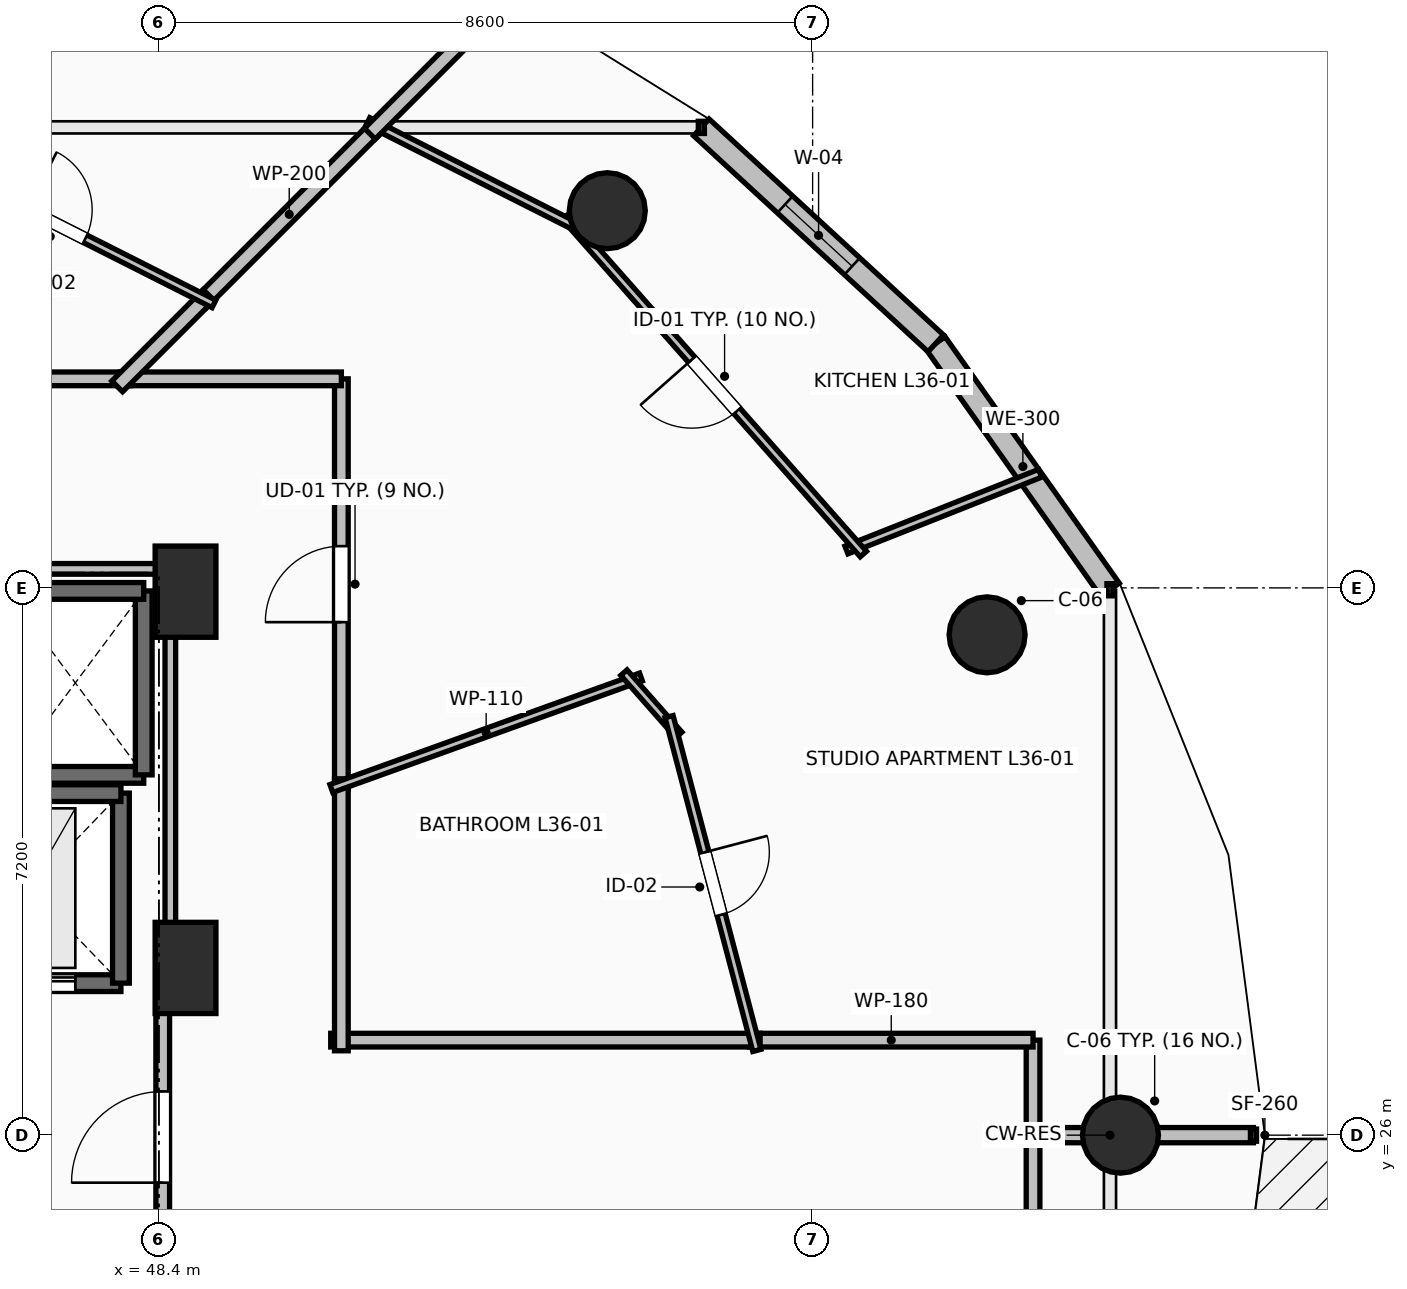
"""IFC4 building model, lengths in metres.
Left out: names, types, materials, properties, quantities, classifications, styles, units other than length and angle.
Written with IfcOpenShell. Run it as: python <this file> out.ifc"""

import sys

from ifc_helpers import new_model, si_unit, direction, frame, frame_2d, origin, origin_2d, place, context, subcontext, project, spatial, rectangle, circle, extrude, element, fill, save


model = new_model("IFC4")
c1 = context("Model", 3, precision=1e-05, world=origin(), true_north=direction((0.0, 1.0)))
c2 = subcontext(c1, "Body", "Model", "MODEL_VIEW")
j1 = project(units=[si_unit("LENGTHUNIT", "METRE"), si_unit("PLANEANGLEUNIT", "RADIAN")], contexts=[c1])
p1 = place(None, origin())
s1 = spatial("IfcSite", under=j1, at=p1, CompositionType="ELEMENT")
p2 = place(p1, origin())
s2 = spatial("IfcBuilding", under=s1, at=p2, CompositionType="ELEMENT")
p3 = place(p2, frame((0.0, 0.0, 136.1)))
s3 = spatial("IfcBuildingStorey", under=s2, at=p3, CompositionType="ELEMENT", Elevation=136.1)
for number, where, z_axis, x_axis in (
    (1, (61.05, 26.0, 0.0), (0.0, 0.0, 1.0), (1.0, 0.0, 0.0)),
    (2, (59.295, 32.582, 0.0), (0.0, 0.0, 1.0), (0.924, 0.383, 0.0)),
    (3, (54.299, 38.162, 0.0), (0.0, 0.0, 1.0), (0.707, 0.707, 0.0)),
):
    element("IfcColumn", number, at=place(p3, frame(where, z_axis=z_axis, x_axis=x_axis)), inside=s3, PredefinedType="COLUMN", context=c2, shape_type="SweptSolid", body=[
        extrude(circle(Radius=0.5, at=origin_2d()), origin(), (0.0, 0.0, 1.0), 3.5),
    ])
for number, where, z_axis, x_axis in (
    (4, (48.75, 33.15, 0.0), (0.0, 0.0, 1.0), (1.0, 0.0, 0.0)),
    (5, (48.75, 28.2, 0.0), (0.0, 0.0, 1.0), (1.0, 0.0, 0.0)),
):
    element("IfcColumn", number, at=place(p3, frame(where, z_axis=z_axis, x_axis=x_axis)), inside=s3, PredefinedType="PILASTER", context=c2, shape_type="SweptSolid", body=[
        extrude(rectangle(XDim=0.8, YDim=1.2, at=origin_2d()), origin(), (0.0, 0.0, 1.0), 3.5),
    ])
p4 = place(p3, frame((60.912, 33.175, 0.0), z_axis=(0.0, 0.0, 1.0), x_axis=(-0.577269753207, 0.816553508371, 0.0)))
e6 = element("IfcWall", 6, at=p4, inside=s3, PredefinedType="STANDARD", context=c2, shape_type="SweptSolid", body=[
    extrude(rectangle(XDim=3.97, YDim=0.3, at=frame_2d((1.985, 0.0))), origin(), (0.0, 0.0, 1.0), 3.24),
])
p5 = place(p3, frame((58.62, 36.417, 0.0), z_axis=(0.0, 0.0, 1.0), x_axis=(-0.735477154165, 0.677549522693, 0.0)))
e7 = element("IfcWall", 7, at=p5, inside=s3, PredefinedType="STANDARD", context=c2, shape_type="SweptSolid", body=[
    extrude(rectangle(XDim=4.194, YDim=0.3, at=frame_2d((2.097, 0.0))), origin(), (0.0, 0.0, 1.0), 3.24),
])
p6 = place(p5, frame((1.497, 0.0, 0.85)))
e8 = element("IfcOpeningElement", 8, at=p6, cuts=e7, PredefinedType="OPENING", context=c2, shape_type="SweptSolid", body=[
    extrude(rectangle(XDim=1.2, YDim=2.1, at=frame_2d((0.6, 1.05))), frame((0.0, 0.165, 0.0), z_axis=(0.0, -1.0, 0.0), x_axis=(1.0, 0.0, 0.0)), (0.0, 0.0, 1.0), 0.33),
])
p7 = place(p3, frame((46.4, 30.74, 0.0), z_axis=(0.0, 0.0, 1.0), x_axis=(1.0, 0.0, 0.0)))
e9 = element("IfcWall", 9, at=p7, inside=s3, PredefinedType="SOLIDWALL", context=c2, shape_type="SweptSolid", body=[
    extrude(rectangle(XDim=1.8, YDim=0.22, at=frame_2d((0.9, 0.0))), origin(), (0.0, 0.0, 1.0), 3.24),
])
p8 = place(p3, frame((48.2, 30.74, 0.0), z_axis=(0.0, 0.0, 1.0), x_axis=(0.0, 1.0, 0.0)))
e10 = element("IfcWall", 10, at=p8, inside=s3, PredefinedType="SOLIDWALL", context=c2, shape_type="SweptSolid", body=[
    extrude(rectangle(XDim=2.42, YDim=0.22, at=frame_2d((1.21, 0.0))), origin(), (0.0, 0.0, 1.0), 3.24),
])
p9 = place(p3, frame((48.2, 33.16, 0.0), z_axis=(0.0, 0.0, 1.0), x_axis=(-1.0, 0.0, 0.0)))
e11 = element("IfcWall", 11, at=p9, inside=s3, PredefinedType="SOLIDWALL", context=c2, shape_type="SweptSolid", body=[
    extrude(rectangle(XDim=1.8, YDim=0.22, at=frame_2d((0.9, 0.0))), origin(), (0.0, 0.0, 1.0), 3.24),
])
p10 = place(p3, frame((45.5, 28.0, 0.0), z_axis=(0.0, 0.0, 1.0), x_axis=(1.0, 0.0, 0.0)))
e12 = element("IfcWall", 12, at=p10, inside=s3, PredefinedType="SHEAR", context=c2, shape_type="SweptSolid", body=[
    extrude(rectangle(XDim=2.4, YDim=0.22, at=frame_2d((1.2, 0.0))), origin(), (0.0, 0.0, 1.0), 3.24),
])
p11 = place(p10, frame((0.6, 0.0, 0.0)))
e13 = element("IfcOpeningElement", 13, at=p11, cuts=e12, PredefinedType="OPENING", context=c2, shape_type="SweptSolid", body=[
    extrude(rectangle(XDim=1.2, YDim=2.2, at=frame_2d((0.6, 1.1))), frame((0.0, 0.125, 0.0), z_axis=(0.0, -1.0, 0.0), x_axis=(1.0, 0.0, 0.0)), (0.0, 0.0, 1.0), 0.25),
])
p12 = place(p3, frame((47.9, 28.0, 0.0), z_axis=(0.0, 0.0, 1.0), x_axis=(0.0, 1.0, 0.0)))
e14 = element("IfcWall", 14, at=p12, inside=s3, PredefinedType="SHEAR", context=c2, shape_type="SweptSolid", body=[
    extrude(rectangle(XDim=2.5, YDim=0.22, at=frame_2d((1.25, 0.0))), origin(), (0.0, 0.0, 1.0), 3.24),
])
p13 = place(p3, frame((47.9, 30.5, 0.0), z_axis=(0.0, 0.0, 1.0), x_axis=(-1.0, 0.0, 0.0)))
e15 = element("IfcWall", 15, at=p13, inside=s3, PredefinedType="SHEAR", context=c2, shape_type="SweptSolid", body=[
    extrude(rectangle(XDim=2.4, YDim=0.22, at=frame_2d((1.2, 0.0))), origin(), (0.0, 0.0, 1.0), 3.24),
])
p14 = place(p3, frame((48.45, 23.95, 0.0), z_axis=(0.0, 0.0, 1.0), x_axis=(0.0, 1.0, 0.0)))
e16 = element("IfcWall", 16, at=p14, inside=s3, PredefinedType="PARTITIONING", context=c2, shape_type="SweptSolid", body=[
    extrude(rectangle(XDim=4.05, YDim=0.18, at=frame_2d((2.025, 0.0))), origin(), (0.0, 0.0, 1.0), 3.24),
])
p15 = place(p14, frame((1.425, 0.0, 0.0)))
e17 = element("IfcOpeningElement", 17, at=p15, cuts=e16, PredefinedType="OPENING", context=c2, shape_type="SweptSolid", body=[
    extrude(rectangle(XDim=1.2, YDim=2.15, at=frame_2d((0.6, 1.075))), frame((0.0, 0.105, 0.0), z_axis=(0.0, -1.0, 0.0), x_axis=(1.0, 0.0, 0.0)), (0.0, 0.0, 1.0), 0.21),
])
p16 = place(p3, frame((59.9, 25.94, 0.0), z_axis=(0.0, 0.0, 1.0), x_axis=(0.0, 1.0, 0.0)))
e18 = element("IfcWall", 18, at=p16, inside=s3, PredefinedType="PARTITIONING", context=c2, shape_type="SweptSolid", body=[
    extrude(rectangle(XDim=1.31, YDim=0.18, at=frame_2d((0.655, 0.0))), origin(), (0.0, 0.0, 1.0), 2.432),
])
p17 = place(p3, frame((59.9, 27.25, 0.0), z_axis=(0.0, 0.0, 1.0), x_axis=(-1.0, 0.0, 0.0)))
e19 = element("IfcWall", 19, at=p17, inside=s3, PredefinedType="PARTITIONING", context=c2, shape_type="SweptSolid", body=[
    extrude(rectangle(XDim=3.731, YDim=0.18, at=frame_2d((1.865, 0.0))), origin(), (0.0, 0.0, 1.0), 2.874),
])
p18 = place(p3, frame((50.8, 30.548, 0.0), z_axis=(0.0, 0.0, 1.0), x_axis=(0.0, 1.0, 0.0)))
e20 = element("IfcWall", 20, at=p18, inside=s3, PredefinedType="PARTITIONING", context=c2, shape_type="SweptSolid", body=[
    extrude(rectangle(XDim=5.402, YDim=0.18, at=frame_2d((2.701, 0.0))), origin(), (0.0, 0.0, 1.0), 2.432),
])
p19 = place(p18, frame((2.201, 0.0, 0.0)))
e21 = element("IfcOpeningElement", 21, at=p19, cuts=e20, PredefinedType="OPENING", context=c2, shape_type="SweptSolid", body=[
    extrude(rectangle(XDim=1.0, YDim=2.15, at=frame_2d((0.5, 1.075))), frame((0.0, 0.105, 0.0), z_axis=(0.0, -1.0, 0.0), x_axis=(1.0, 0.0, 0.0)), (0.0, 0.0, 1.0), 0.21),
])
p20 = place(p3, frame((50.8, 35.95, 0.0), z_axis=(0.0, 0.0, 1.0), x_axis=(-1.0, 0.0, 0.0)))
e22 = element("IfcWall", 22, at=p20, inside=s3, PredefinedType="PARTITIONING", context=c2, shape_type="SweptSolid", body=[
    extrude(rectangle(XDim=2.91, YDim=0.18, at=frame_2d((1.455, 0.0))), origin(), (0.0, 0.0, 1.0), 2.432),
])
p21 = place(p3, frame((56.309, 27.25, 0.0), z_axis=(0.0, 0.0, 1.0), x_axis=(-1.0, 0.0, 0.0)))
e23 = element("IfcWall", 23, at=p21, inside=s3, PredefinedType="PARTITIONING", context=c2, shape_type="SweptSolid", body=[
    extrude(rectangle(XDim=5.649, YDim=0.18, at=frame_2d((2.825, 0.0))), origin(), (0.0, 0.0, 1.0), 2.432),
])
p22 = place(p3, frame((50.8, 27.11, 0.0), z_axis=(0.0, 0.0, 1.0), x_axis=(0.0, 1.0, 0.0)))
e24 = element("IfcWall", 24, at=p22, inside=s3, PredefinedType="PARTITIONING", context=c2, shape_type="SweptSolid", body=[
    extrude(rectangle(XDim=3.578, YDim=0.18, at=frame_2d((1.789, 0.0))), origin(), (0.0, 0.0, 1.0), 2.432),
])
p23 = place(p3, frame((48.03, 35.95, 0.0), z_axis=(0.0, 0.0, 1.0), x_axis=(-1.0, 0.0, 0.0)))
e25 = element("IfcWall", 25, at=p23, inside=s3, PredefinedType="PARTITIONING", context=c2, shape_type="SweptSolid", body=[
    extrude(rectangle(XDim=5.422, YDim=0.18, at=frame_2d((2.711, 0.0))), origin(), (0.0, 0.0, 1.0), 2.432),
])
p24 = place(p3, frame((59.9, 24.55, 0.0), z_axis=(0.0, 0.0, 1.0), x_axis=(0.0, 1.0, 0.0)))
e26 = element("IfcWall", 26, at=p24, inside=s3, PredefinedType="PARTITIONING", context=c2, shape_type="SweptSolid", body=[
    extrude(rectangle(XDim=1.39, YDim=0.18, at=frame_2d((0.695, 0.0))), origin(), (0.0, 0.0, 1.0), 2.432),
])
p25 = place(p3, frame((50.668, 30.561, 0.0), z_axis=(0.0, 0.0, 1.0), x_axis=(0.94086224956, 0.33878935543, 0.0)))
e27 = element("IfcWall", 27, at=p25, inside=s3, PredefinedType="PARTITIONING", context=c2, shape_type="SweptSolid", body=[
    extrude(rectangle(XDim=4.33, YDim=0.11, at=frame_2d((2.165, 0.0))), origin(), (0.0, 0.0, 1.0), 2.922),
])
p26 = place(p3, frame((54.517, 32.085, 0.0), z_axis=(0.0, 0.0, 1.0), x_axis=(0.661444121134, -0.749994449724, 0.0)))
e28 = element("IfcWall", 28, at=p26, inside=s3, PredefinedType="PARTITIONING", context=c2, shape_type="SweptSolid", body=[
    extrude(rectangle(XDim=1.092, YDim=0.11, at=frame_2d((0.546, 0.0))), origin(), (0.0, 0.0, 1.0), 3.24),
])
p27 = place(p3, frame((55.111, 31.506, 0.0), z_axis=(0.0, 0.0, 1.0), x_axis=(0.254395386743, -0.96710029842, 0.0)))
e29 = element("IfcWall", 29, at=p27, inside=s3, PredefinedType="PARTITIONING", context=c2, shape_type="SweptSolid", body=[
    extrude(rectangle(XDim=4.541, YDim=0.11, at=frame_2d((2.271, 0.0))), origin(), (0.0, 0.0, 1.0), 2.432),
])
p28 = place(p27, frame((1.846, 0.0, 0.0)))
e30 = element("IfcOpeningElement", 30, at=p28, cuts=e29, PredefinedType="OPENING", context=c2, shape_type="SweptSolid", body=[
    extrude(rectangle(XDim=0.85, YDim=2.1, at=frame_2d((0.425, 1.05))), frame((0.0, 0.07, 0.0), z_axis=(0.0, -1.0, 0.0), x_axis=(1.0, 0.0, 0.0)), (0.0, 0.0, 1.0), 0.14),
])
p29 = place(p3, frame((59.993, 34.708, 0.0), z_axis=(0.0, 0.0, 1.0), x_axis=(-0.92976723416, -0.368147919025, 0.0)))
e31 = element("IfcWall", 31, at=p29, inside=s3, PredefinedType="PARTITIONING", context=c2, shape_type="SweptSolid", body=[
    extrude(rectangle(XDim=2.741, YDim=0.11, at=frame_2d((1.37, 0.0))), origin(), (0.0, 0.0, 1.0), 2.728),
])
p30 = place(p3, frame((57.668, 33.645, 0.0), z_axis=(0.0, 0.0, 1.0), x_axis=(-0.66214504072, 0.749375703536, 0.0)))
e32 = element("IfcWall", 32, at=p30, inside=s3, PredefinedType="PARTITIONING", context=c2, shape_type="SweptSolid", body=[
    extrude(rectangle(XDim=5.922, YDim=0.11, at=frame_2d((2.961, 0.0))), origin(), (0.0, 0.0, 1.0), 2.432),
])
p31 = place(p30, frame((2.511, 0.0, 0.0)))
e33 = element("IfcOpeningElement", 33, at=p31, cuts=e32, PredefinedType="OPENING", context=c2, shape_type="SweptSolid", body=[
    extrude(rectangle(XDim=0.9, YDim=2.1, at=frame_2d((0.45, 1.05))), frame((0.0, 0.07, 0.0), z_axis=(0.0, -1.0, 0.0), x_axis=(1.0, 0.0, 0.0)), (0.0, 0.0, 1.0), 0.14),
])
p32 = place(p3, frame((53.964, 37.915, 0.0), z_axis=(0.0, 0.0, 1.0), x_axis=(-0.892546166909, 0.450956028828, 0.0)))
e34 = element("IfcWall", 34, at=p32, inside=s3, PredefinedType="PARTITIONING", context=c2, shape_type="SweptSolid", body=[
    extrude(rectangle(XDim=3.154, YDim=0.11, at=frame_2d((1.577, 0.0))), origin(), (0.0, 0.0, 1.0), 2.432),
])
p33 = place(p3, frame((51.274, 39.274, 0.0), z_axis=(0.0, 0.0, 1.0), x_axis=(-0.707106781187, -0.707106781187, 0.0)))
e35 = element("IfcWall", 35, at=p33, inside=s3, PredefinedType="PARTITIONING", context=c2, shape_type="SweptSolid", body=[
    extrude(rectangle(XDim=3.281, YDim=0.2, at=frame_2d((1.64, 0.0))), origin(), (0.0, 0.0, 1.0), 2.874),
])
p34 = place(p3, frame((49.053, 37.053, 0.0), z_axis=(0.0, 0.0, 1.0), x_axis=(-0.707106781187, -0.707106781187, 0.0)))
e36 = element("IfcWall", 36, at=p34, inside=s3, PredefinedType="PARTITIONING", context=c2, shape_type="SweptSolid", body=[
    extrude(rectangle(XDim=1.7, YDim=0.2, at=frame_2d((0.85, 0.0))), origin(), (0.0, 0.0, 1.0), 2.432),
])
p35 = place(p3, frame((59.9, 26.0, 0.0), z_axis=(0.0, 0.0, 1.0), x_axis=(1.0, 0.0, 0.0)))
e37 = element("IfcWall", 37, at=p35, inside=s3, PredefinedType="PARTITIONING", context=c2, shape_type="SweptSolid", body=[
    extrude(rectangle(XDim=2.899, YDim=0.2, at=frame_2d((1.45, 0.0))), origin(), (0.0, 0.0, 1.0), 2.432),
])
p36 = place(p3, frame((52.994, 40.994, 0.0), z_axis=(0.0, 0.0, 1.0), x_axis=(-0.707106781187, -0.707106781187, 0.0)))
e38 = element("IfcWall", 38, at=p36, inside=s3, PredefinedType="PARTITIONING", context=c2, shape_type="SweptSolid", body=[
    extrude(rectangle(XDim=2.572, YDim=0.2, at=frame_2d((1.286, 0.0))), origin(), (0.0, 0.0, 1.0), 2.728),
])
p37 = place(p3, frame((44.978, 39.031, 0.0), z_axis=(0.0, 0.0, 1.0), x_axis=(0.892495276856, -0.451056737882, 0.0)))
e39 = element("IfcWall", 39, at=p37, inside=s3, PredefinedType="PARTITIONING", context=c2, shape_type="SweptSolid", body=[
    extrude(rectangle(XDim=4.645, YDim=0.11, at=frame_2d((2.323, 0.0))), origin(), (0.0, 0.0, 1.0), 2.432),
])
p38 = place(p37, frame((1.898, 0.0, 0.0)))
e40 = element("IfcOpeningElement", 40, at=p38, cuts=e39, PredefinedType="OPENING", context=c2, shape_type="SweptSolid", body=[
    extrude(rectangle(XDim=0.85, YDim=2.1, at=frame_2d((0.425, 1.05))), frame((0.0, 0.07, 0.0), z_axis=(0.0, -1.0, 0.0), x_axis=(1.0, 0.0, 0.0)), (0.0, 0.0, 1.0), 0.14),
])
p39 = place(p3, frame((48.55, 28.196, 0.0), z_axis=(0.0, 0.0, 1.0), x_axis=(0.0, 1.0, 0.0)))
e41 = element("IfcWall", 41, at=p39, inside=s3, PredefinedType="PARTITIONING", context=c2, shape_type="SweptSolid", body=[
    extrude(rectangle(XDim=5.254, YDim=0.14, at=frame_2d((2.627, 0.0))), origin(), (0.0, 0.0, 1.0), 2.432),
])
p40 = place(p3, frame((48.55, 33.45, 0.0), z_axis=(0.0, 0.0, 1.0), x_axis=(-1.0, 0.0, 0.0)))
e42 = element("IfcWall", 42, at=p40, inside=s3, PredefinedType="PARTITIONING", context=c2, shape_type="SweptSolid", body=[
    extrude(rectangle(XDim=4.21, YDim=0.14, at=frame_2d((2.105, 0.0))), origin(), (0.0, 0.0, 1.0), 2.432),
])
p41 = place(p6, origin())
e43 = element("IfcWindow", 43, at=p41, inside=s3, PartitioningType="SINGLE_PANEL", PredefinedType="WINDOW", context=c2, shape_type="SweptSolid", body=[
    extrude(rectangle(XDim=1.2, YDim=2.1, at=frame_2d((0.6, 1.05))), frame((0.0, 0.03, 0.0), z_axis=(0.0, -1.0, 0.0), x_axis=(1.0, 0.0, 0.0)), (0.0, 0.0, 1.0), 0.06),
])
fill(e8, e43)
p42 = place(p11, origin())
e44 = element("IfcDoor", 44, at=p42, inside=s3, OperationType="SLIDING_TO_LEFT", PredefinedType="DOOR", context=c2, shape_type="SweptSolid", body=[
    extrude(rectangle(XDim=1.2, YDim=2.2, at=frame_2d((0.6, 1.1))), frame((0.0, 0.025, 0.0), z_axis=(0.0, -1.0, 0.0), x_axis=(1.0, 0.0, 0.0)), (0.0, 0.0, 1.0), 0.05),
])
fill(e13, e44)
p43 = place(p15, origin())
e45 = element("IfcDoor", 45, at=p43, inside=s3, OperationType="SINGLE_SWING_LEFT", PredefinedType="DOOR", context=c2, shape_type="SweptSolid", body=[
    extrude(rectangle(XDim=1.2, YDim=2.15, at=frame_2d((0.6, 1.075))), frame((0.0, 0.025, 0.0), z_axis=(0.0, -1.0, 0.0), x_axis=(1.0, 0.0, 0.0)), (0.0, 0.0, 1.0), 0.05),
])
fill(e17, e45)
p44 = place(p19, origin())
e46 = element("IfcDoor", 46, at=p44, inside=s3, OperationType="SINGLE_SWING_LEFT", PredefinedType="DOOR", context=c2, shape_type="SweptSolid", body=[
    extrude(rectangle(XDim=1.0, YDim=2.15, at=frame_2d((0.5, 1.075))), frame((0.0, 0.025, 0.0), z_axis=(0.0, -1.0, 0.0), x_axis=(1.0, 0.0, 0.0)), (0.0, 0.0, 1.0), 0.05),
])
fill(e21, e46)
p45 = place(p28, origin())
e47 = element("IfcDoor", 47, at=p45, inside=s3, OperationType="SINGLE_SWING_LEFT", PredefinedType="DOOR", context=c2, shape_type="SweptSolid", body=[
    extrude(rectangle(XDim=0.85, YDim=2.1, at=frame_2d((0.425, 1.05))), frame((0.0, 0.025, 0.0), z_axis=(0.0, -1.0, 0.0), x_axis=(1.0, 0.0, 0.0)), (0.0, 0.0, 1.0), 0.05),
])
fill(e30, e47)
p46 = place(p31, origin())
e48 = element("IfcDoor", 48, at=p46, inside=s3, OperationType="SINGLE_SWING_RIGHT", PredefinedType="DOOR", context=c2, shape_type="SweptSolid", body=[
    extrude(rectangle(XDim=0.9, YDim=2.1, at=frame_2d((0.45, 1.05))), frame((0.0, 0.025, 0.0), z_axis=(0.0, -1.0, 0.0), x_axis=(1.0, 0.0, 0.0)), (0.0, 0.0, 1.0), 0.05),
])
fill(e33, e48)
p47 = place(p38, origin())
e49 = element("IfcDoor", 49, at=p47, inside=s3, OperationType="SINGLE_SWING_LEFT", PredefinedType="DOOR", context=c2, shape_type="SweptSolid", body=[
    extrude(rectangle(XDim=0.85, YDim=2.1, at=frame_2d((0.425, 1.05))), frame((0.0, 0.025, 0.0), z_axis=(0.0, -1.0, 0.0), x_axis=(1.0, 0.0, 0.0)), (0.0, 0.0, 1.0), 0.05),
])
fill(e40, e49)
save(model, sys.argv[1])
